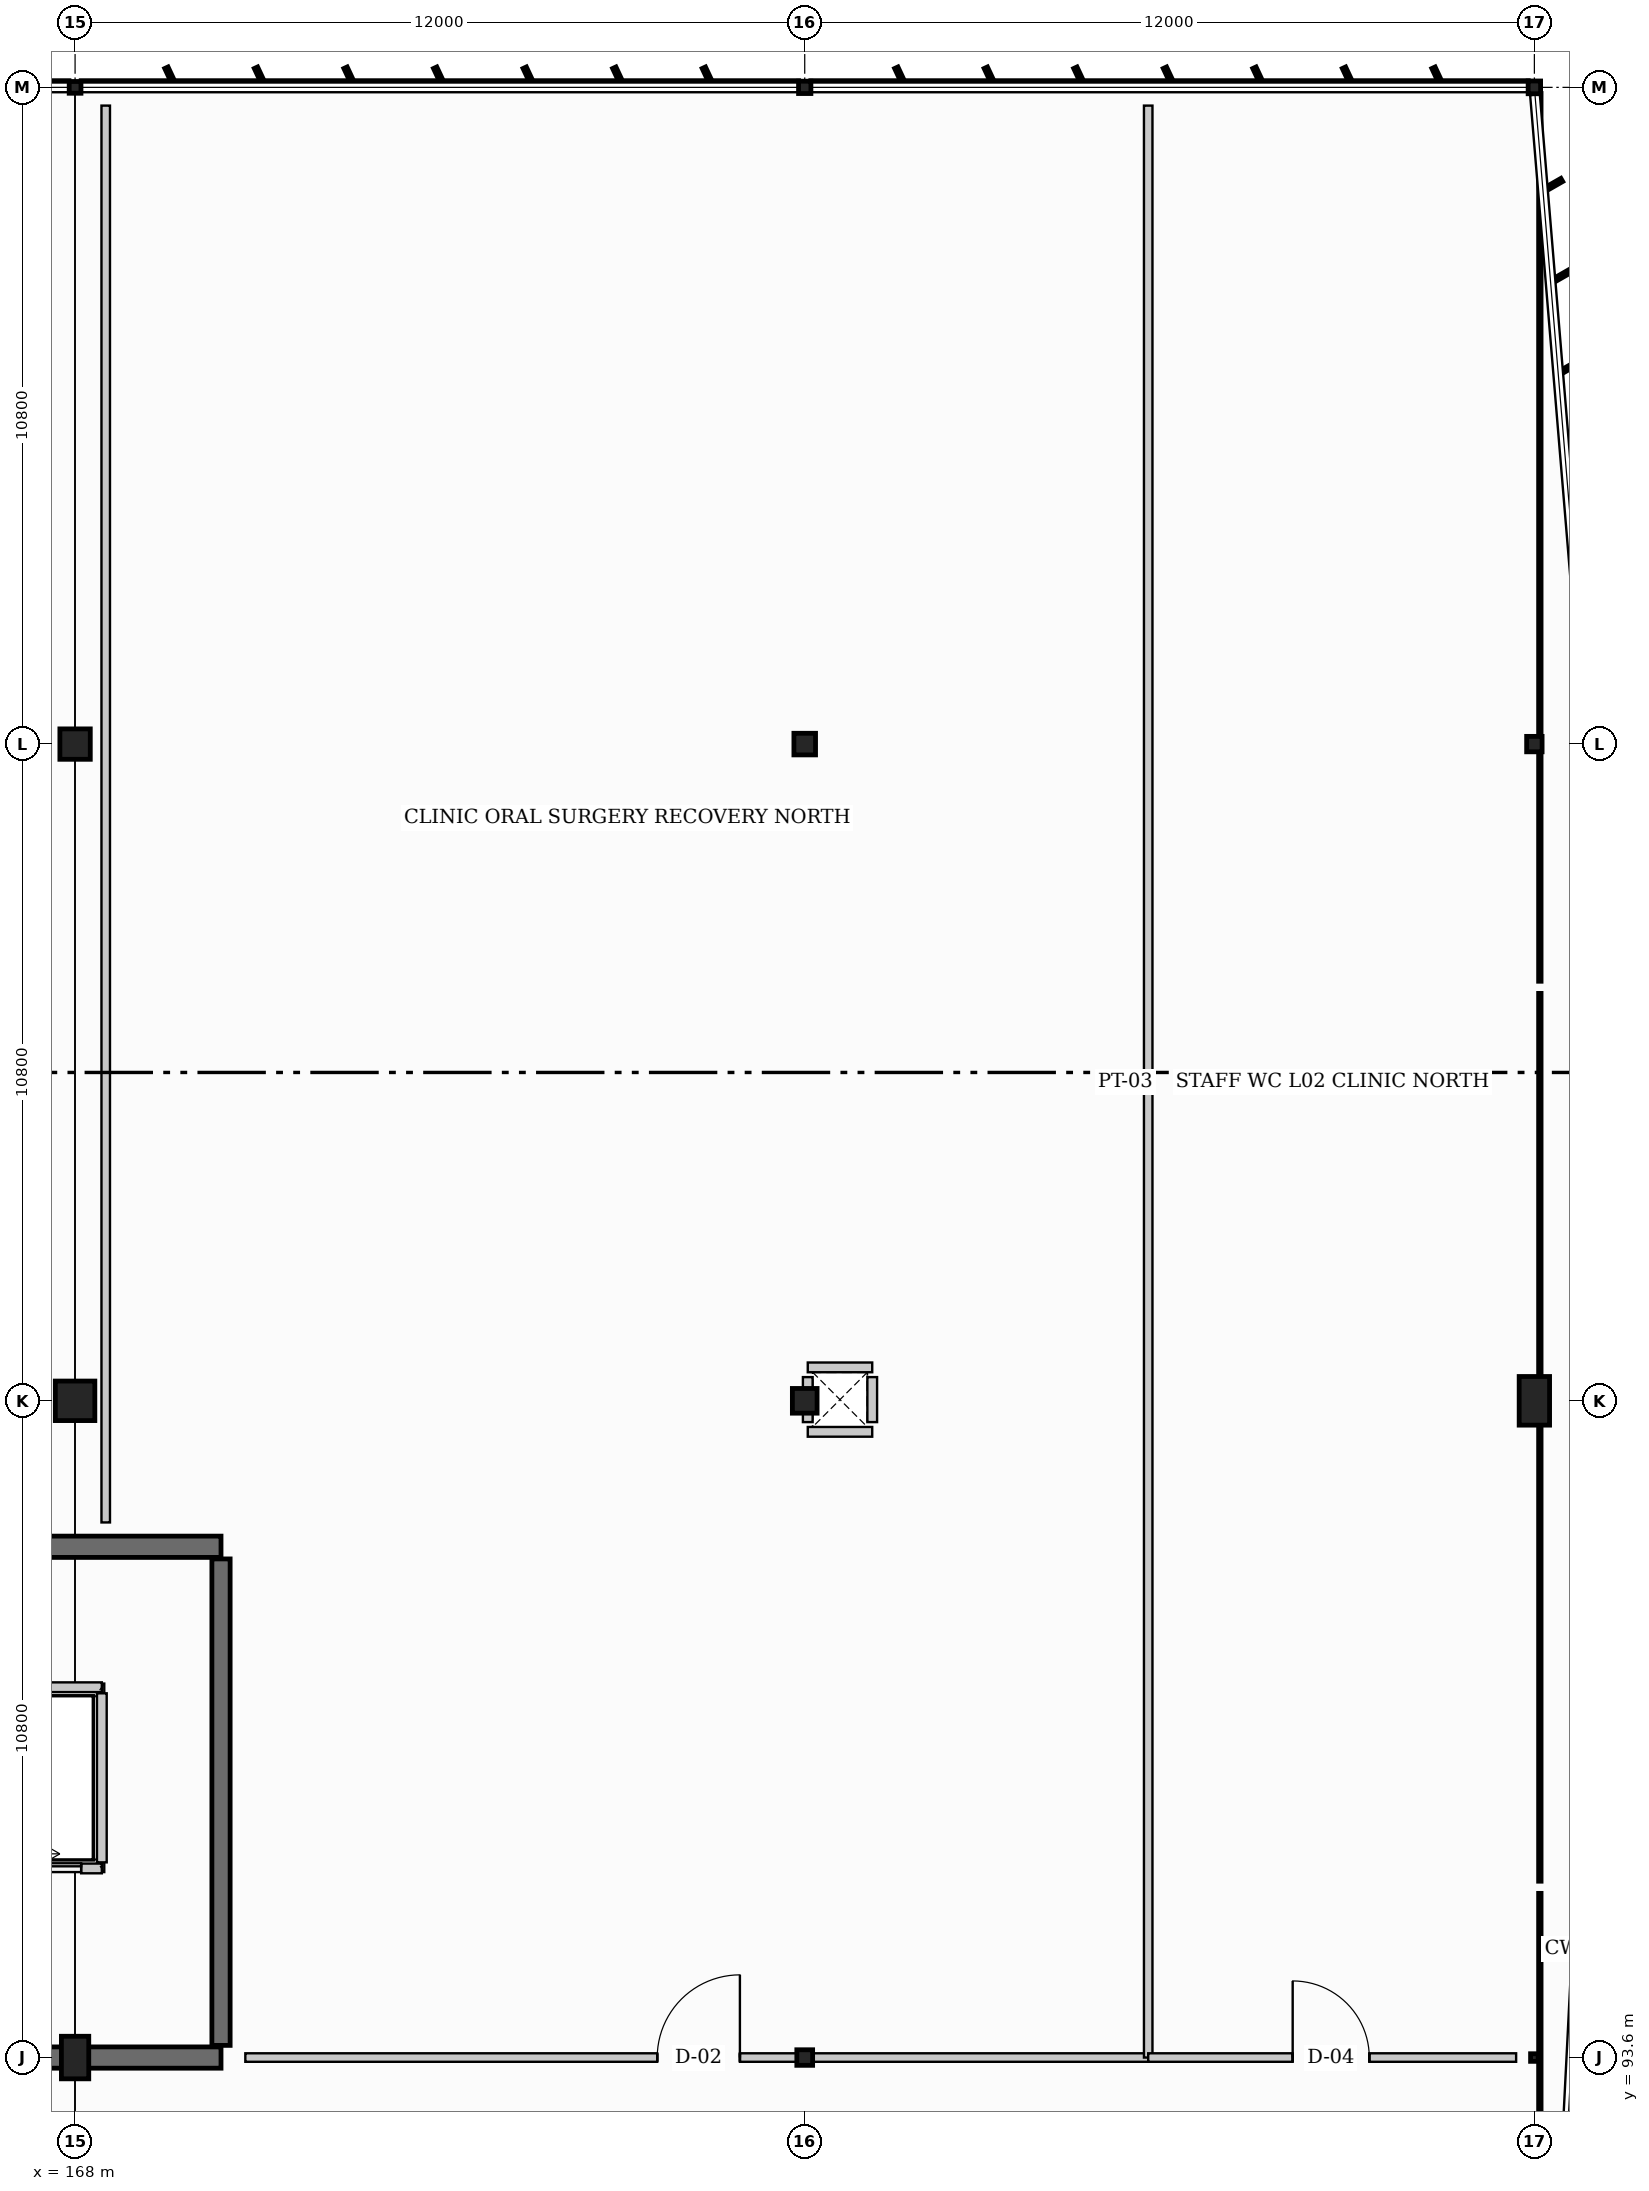
"""IFC4 building model, lengths in metres.
Left out: names, types, materials, properties, quantities, classifications, styles, units other than length and angle.
Written with IfcOpenShell. Run it as: python <this file> out.ifc"""

import sys

from ifc_helpers import new_model, si_unit, direction, frame, frame_2d, origin, origin_2d, place, context, subcontext, project, spatial, rectangle, hollow_rectangle, hollow_circle, i_section, extrude, element, fill, save


model = new_model("IFC4")
c1 = context("Model", 3, precision=1e-05, world=origin(), true_north=direction((0.0, 1.0)))
c2 = subcontext(c1, "Body", "Model", "MODEL_VIEW")
j1 = project(units=[si_unit("LENGTHUNIT", "METRE"), si_unit("PLANEANGLEUNIT", "RADIAN")], contexts=[c1])
p1 = place(None, origin())
s1 = spatial("IfcSite", under=j1, at=p1, CompositionType="ELEMENT")
p2 = place(p1, origin())
s2 = spatial("IfcBuilding", under=s1, at=p2, CompositionType="ELEMENT")
p3 = place(p2, frame((0.0, 0.0, 9.6)))
s3 = spatial("IfcBuildingStorey", under=s2, at=p3, CompositionType="ELEMENT", Elevation=9.6)
p4 = place(p3, frame((168.0, 93.6, 0.0), z_axis=(0.0, 0.0, 1.0), x_axis=(1.0, 0.0, 0.0)))
e1 = element("IfcColumn", 1, at=p4, inside=s3, PredefinedType="PILASTER", context=c2, shape_type="SweptSolid", body=[
    extrude(rectangle(XDim=0.45, YDim=0.7, at=origin_2d()), origin(), (0.0, 0.0, 1.0), 4.8),
])
p5 = place(p3, frame((168.0, 104.4, 0.0), z_axis=(0.0, 0.0, 1.0), x_axis=(1.0, 0.0, 0.0)))
e2 = element("IfcColumn", 2, at=p5, inside=s3, PredefinedType="COLUMN", context=c2, shape_type="SweptSolid", body=[
    extrude(rectangle(XDim=0.65, YDim=0.65, at=origin_2d()), origin(), (0.0, 0.0, 1.0), 4.8),
])
p6 = place(p3, frame((168.0, 115.2, 0.0), z_axis=(0.0, 0.0, 1.0), x_axis=(1.0, 0.0, 0.0)))
e3 = element("IfcColumn", 3, at=p6, inside=s3, PredefinedType="COLUMN", context=c2, shape_type="SweptSolid", body=[
    extrude(i_section(OverallWidth=0.5, OverallDepth=0.5, WebThickness=0.022, FlangeThickness=0.036, at=origin_2d()), origin(), (0.0, 0.0, 1.0), 4.8),
])
p7 = place(p3, frame((168.0, 126.0, 0.0), z_axis=(0.0, 0.0, 1.0), x_axis=(1.0, 0.0, 0.0)))
e4 = element("IfcColumn", 4, at=p7, inside=s3, PredefinedType="COLUMN", context=c2, shape_type="SweptSolid", body=[
    extrude(hollow_circle(Radius=0.097, WallThickness=0.008, at=origin_2d()), origin(), (0.0, 0.0, 1.0), 4.8),
])
p8 = place(p3, frame((180.0, 93.6, 0.0), z_axis=(0.0, 0.0, 1.0), x_axis=(0.0, 1.0, 0.0)))
e5 = element("IfcColumn", 5, at=p8, inside=s3, PredefinedType="COLUMN", context=c2, shape_type="SweptSolid", body=[
    extrude(i_section(OverallWidth=0.256, OverallDepth=0.26, WebThickness=0.01, FlangeThickness=0.017, at=origin_2d()), origin(), (0.0, 0.0, 1.0), 4.8),
])
p9 = place(p3, frame((180.0, 104.4, 0.0), z_axis=(0.0, 0.0, 1.0), x_axis=(0.0, 1.0, 0.0)))
e6 = element("IfcColumn", 6, at=p9, inside=s3, PredefinedType="COLUMN", context=c2, shape_type="SweptSolid", body=[
    extrude(hollow_circle(Radius=0.203, WallThickness=0.016, at=origin_2d()), origin(), (0.0, 0.0, 1.0), 4.8),
])
p10 = place(p3, frame((180.0, 115.2, 0.0), z_axis=(0.0, 0.0, 1.0), x_axis=(0.0, 1.0, 0.0)))
e7 = element("IfcColumn", 7, at=p10, inside=s3, PredefinedType="COLUMN", context=c2, shape_type="SweptSolid", body=[
    extrude(hollow_circle(Radius=0.178, WallThickness=0.013, at=origin_2d()), origin(), (0.0, 0.0, 1.0), 4.8),
])
p11 = place(p3, frame((180.0, 126.0, 0.0), z_axis=(0.0, 0.0, 1.0), x_axis=(0.0, 1.0, 0.0)))
e8 = element("IfcColumn", 8, at=p11, inside=s3, PredefinedType="COLUMN", context=c2, shape_type="SweptSolid", body=[
    extrude(i_section(OverallWidth=0.203, OverallDepth=0.203, WebThickness=0.007, FlangeThickness=0.011, at=origin_2d()), origin(), (0.0, 0.0, 1.0), 4.8),
])
p12 = place(p3, frame((192.0, 93.6, 0.0), z_axis=(0.0, 0.0, 1.0), x_axis=(1.0, 0.0, 0.0)))
e9 = element("IfcColumn", 9, at=p12, inside=s3, PredefinedType="COLUMN", context=c2, shape_type="SweptSolid", body=[
    extrude(hollow_rectangle(XDim=0.125, YDim=0.125, WallThickness=0.006, at=origin_2d()), origin(), (0.0, 0.0, 1.0), 4.8),
])
p13 = place(p3, frame((192.0, 104.4, 0.0), z_axis=(0.0, 0.0, 1.0), x_axis=(1.0, 0.0, 0.0)))
e10 = element("IfcColumn", 10, at=p13, inside=s3, PredefinedType="PILASTER", context=c2, shape_type="SweptSolid", body=[
    extrude(rectangle(XDim=0.5, YDim=0.8, at=origin_2d()), origin(), (0.0, 0.0, 1.0), 4.8),
])
p14 = place(p3, frame((192.0, 115.2, 0.0), z_axis=(0.0, 0.0, 1.0), x_axis=(1.0, 0.0, 0.0)))
e11 = element("IfcColumn", 11, at=p14, inside=s3, PredefinedType="COLUMN", context=c2, shape_type="SweptSolid", body=[
    extrude(i_section(OverallWidth=0.254, OverallDepth=0.254, WebThickness=0.009, FlangeThickness=0.014, at=origin_2d()), origin(), (0.0, 0.0, 1.0), 4.8),
])
p15 = place(p3, frame((192.0, 126.0, 0.0), z_axis=(0.0, 0.0, 1.0), x_axis=(1.0, 0.0, 0.0)))
e12 = element("IfcColumn", 12, at=p15, inside=s3, PredefinedType="COLUMN", context=c2, shape_type="SweptSolid", body=[
    extrude(i_section(OverallWidth=0.205, OverallDepth=0.21, WebThickness=0.009, FlangeThickness=0.014, at=origin_2d()), origin(), (0.0, 0.0, 1.0), 4.8),
])
p16 = place(p3, frame((156.0, 102.0, 0.0), z_axis=(0.0, 0.0, 1.0), x_axis=(1.0, 0.0, 0.0)))
e13 = element("IfcWall", 13, at=p16, inside=s3, PredefinedType="SHEAR", context=c2, shape_type="SweptSolid", body=[
    extrude(rectangle(XDim=14.4, YDim=0.35, at=frame_2d((7.2, 0.0))), origin(), (0.0, 0.0, 1.0), 4.8),
])
p17 = place(p3, frame((170.4, 93.6, 0.0), z_axis=(0.0, 0.0, 1.0), x_axis=(-1.0, 0.0, 0.0)))
e14 = element("IfcWall", 14, at=p17, inside=s3, PredefinedType="SHEAR", context=c2, shape_type="SweptSolid", body=[
    extrude(rectangle(XDim=14.4, YDim=0.35, at=frame_2d((7.2, 0.0))), origin(), (0.0, 0.0, 1.0), 4.8),
])
p18 = place(p17, frame((3.172, 0.0, 0.0)))
e15 = element("IfcOpeningElement", 15, at=p18, cuts=e14, PredefinedType="OPENING", context=c2, shape_type="SweptSolid", body=[
    extrude(rectangle(XDim=1.64, YDim=2.2, at=frame_2d((0.82, 1.1))), frame((0.0, 0.185, 0.0), z_axis=(0.0, -1.0, 0.0), x_axis=(1.0, 0.0, 0.0)), (0.0, 0.0, 1.0), 0.37),
])
p19 = place(p3, frame((170.4, 101.8, 0.0), z_axis=(0.0, 0.0, 1.0), x_axis=(0.0, -1.0, 0.0)))
e16 = element("IfcWall", 16, at=p19, inside=s3, PredefinedType="SHEAR", context=c2, shape_type="SweptSolid", body=[
    extrude(rectangle(XDim=8.0, YDim=0.3, at=frame_2d((4.0, 0.0))), origin(), (0.0, 0.0, 1.0), 4.8),
])
for number, where, z_axis, x_axis in (
    (17, (180.05, 103.89, 0.0), (0.0, 0.0, 1.0), (1.0, 0.0, 0.0)),
    (18, (181.11, 104.95, 0.0), (0.0, 0.0, 1.0), (-1.0, 0.0, 0.0)),
):
    element("IfcWall", number, at=place(p3, frame(where, z_axis=z_axis, x_axis=x_axis)), inside=s3, PredefinedType="PARTITIONING", context=c2, shape_type="SweptSolid", body=[
        extrude(rectangle(XDim=1.06, YDim=0.16, at=frame_2d((0.53, 0.0))), origin(), (0.0, 0.0, 1.0), 3.55),
    ])
for number, where, z_axis, x_axis in (
    (19, (180.05, 104.79, 0.0), (0.0, 0.0, 1.0), (0.0, -1.0, 0.0)),
    (20, (181.11, 104.05, 0.0), (0.0, 0.0, 1.0), (0.0, 1.0, 0.0)),
):
    element("IfcWall", number, at=place(p3, frame(where, z_axis=z_axis, x_axis=x_axis)), inside=s3, PredefinedType="PARTITIONING", context=c2, shape_type="SweptSolid", body=[
        extrude(rectangle(XDim=0.74, YDim=0.16, at=frame_2d((0.37, 0.0))), origin(), (0.0, 0.0, 1.0), 3.55),
    ])
p20 = place(p3, frame((166.36, 96.71, 0.0), z_axis=(0.0, 0.0, 1.0), x_axis=(1.0, 0.0, 0.0)))
e21 = element("IfcWall", 21, at=p20, inside=s3, PredefinedType="PARTITIONING", context=c2, shape_type="SweptSolid", body=[
    extrude(rectangle(XDim=2.08, YDim=0.16, at=frame_2d((1.04, 0.0))), origin(), (0.0, 0.0, 1.0), 4.43),
])
p21 = place(p20, frame((0.34, 0.0, 0.0)))
e22 = element("IfcOpeningElement", 22, at=p21, cuts=e21, PredefinedType="OPENING", context=c2, shape_type="SweptSolid", body=[
    extrude(rectangle(XDim=1.4, YDim=2.2, at=frame_2d((0.7, 1.1))), frame((0.0, 0.09, 0.0), z_axis=(0.0, -1.0, 0.0), x_axis=(1.0, 0.0, 0.0)), (0.0, 0.0, 1.0), 0.18),
])
p22 = place(p3, frame((168.44, 99.69, 0.0), z_axis=(0.0, 0.0, 1.0), x_axis=(-1.0, 0.0, 0.0)))
e23 = element("IfcWall", 23, at=p22, inside=s3, PredefinedType="PARTITIONING", context=c2, shape_type="SweptSolid", body=[
    extrude(rectangle(XDim=2.08, YDim=0.16, at=frame_2d((1.04, 0.0))), origin(), (0.0, 0.0, 1.0), 4.43),
])
p23 = place(p3, frame((168.44, 96.81, 0.0), z_axis=(0.0, 0.0, 1.0), x_axis=(0.0, 1.0, 0.0)))
e24 = element("IfcWall", 24, at=p23, inside=s3, PredefinedType="PARTITIONING", context=c2, shape_type="SweptSolid", body=[
    extrude(rectangle(XDim=2.78, YDim=0.16, at=frame_2d((1.39, 0.0))), origin(), (0.0, 0.0, 1.0), 4.43),
])
p24 = place(p3, frame((168.504, 102.4, 0.0), z_axis=(0.0, 0.0, 1.0), x_axis=(0.0, 1.0, 0.0)))
e25 = element("IfcWall", 25, at=p24, inside=s3, PredefinedType="PARTITIONING", context=c2, shape_type="SweptSolid", body=[
    extrude(rectangle(XDim=23.3, YDim=0.14, at=frame_2d((11.65, 0.0))), origin(), (0.0, 0.0, 1.0), 3.475),
])
p25 = place(p3, frame((170.8, 93.6, 0.0), z_axis=(0.0, 0.0, 1.0), x_axis=(1.0, 0.0, 0.0)))
e26 = element("IfcWall", 26, at=p25, inside=s3, PredefinedType="PARTITIONING", context=c2, shape_type="SweptSolid", body=[
    extrude(rectangle(XDim=14.849, YDim=0.14, at=frame_2d((7.424, 0.0))), origin(), (0.0, 0.0, 1.0), 3.525),
])
p26 = place(p25, frame((6.774, 0.0, 0.0)))
e27 = element("IfcOpeningElement", 27, at=p26, cuts=e26, PredefinedType="OPENING", context=c2, shape_type="SweptSolid", body=[
    extrude(rectangle(XDim=1.36, YDim=2.18, at=frame_2d((0.68, 1.09))), frame((0.0, 0.08, 0.0), z_axis=(0.0, -1.0, 0.0), x_axis=(1.0, 0.0, 0.0)), (0.0, 0.0, 1.0), 0.16),
])
p27 = place(p3, frame((185.649, 93.6, 0.0), z_axis=(0.0, 0.0, 1.0), x_axis=(0.0, 1.0, 0.0)))
e28 = element("IfcWall", 28, at=p27, inside=s3, PredefinedType="PARTITIONING", context=c2, shape_type="SweptSolid", body=[
    extrude(rectangle(XDim=32.1, YDim=0.14, at=frame_2d((16.05, 0.0))), origin(), (0.0, 0.0, 1.0), 3.475),
])
p28 = place(p3, frame((185.649, 93.6, 0.0), z_axis=(0.0, 0.0, 1.0), x_axis=(1.0, 0.0, 0.0)))
e29 = element("IfcWall", 29, at=p28, inside=s3, PredefinedType="PARTITIONING", context=c2, shape_type="SweptSolid", body=[
    extrude(rectangle(XDim=6.051, YDim=0.14, at=frame_2d((3.025, 0.0))), origin(), (0.0, 0.0, 1.0), 3.971),
])
p29 = place(p28, frame((2.376, 0.0, 0.0)))
e30 = element("IfcOpeningElement", 30, at=p29, cuts=e29, PredefinedType="OPENING", context=c2, shape_type="SweptSolid", body=[
    extrude(rectangle(XDim=1.26, YDim=2.14, at=frame_2d((0.63, 1.07))), frame((0.0, 0.08, 0.0), z_axis=(0.0, -1.0, 0.0), x_axis=(1.0, 0.0, 0.0)), (0.0, 0.0, 1.0), 0.16),
])
p30 = place(p21, origin())
e31 = element("IfcDoor", 31, at=p30, inside=s3, OperationType="SLIDING_TO_LEFT", PredefinedType="DOOR", context=c2, shape_type="SweptSolid", body=[
    extrude(rectangle(XDim=1.4, YDim=2.2, at=frame_2d((0.7, 1.1))), frame((0.0, 0.025, 0.0), z_axis=(0.0, -1.0, 0.0), x_axis=(1.0, 0.0, 0.0)), (0.0, 0.0, 1.0), 0.05),
])
fill(e22, e31)
p31 = place(p26, origin())
e32 = element("IfcDoor", 32, at=p31, inside=s3, OperationType="SINGLE_SWING_RIGHT", PredefinedType="DOOR", context=c2, shape_type="SweptSolid", body=[
    extrude(rectangle(XDim=1.36, YDim=2.18, at=frame_2d((0.68, 1.09))), frame((0.0, 0.025, 0.0), z_axis=(0.0, -1.0, 0.0), x_axis=(1.0, 0.0, 0.0)), (0.0, 0.0, 1.0), 0.05),
])
fill(e27, e32)
p32 = place(p29, origin())
e33 = element("IfcDoor", 33, at=p32, inside=s3, OperationType="SINGLE_SWING_LEFT", PredefinedType="DOOR", context=c2, shape_type="SweptSolid", body=[
    extrude(rectangle(XDim=1.26, YDim=2.14, at=frame_2d((0.63, 1.07))), frame((0.0, 0.025, 0.0), z_axis=(0.0, -1.0, 0.0), x_axis=(1.0, 0.0, 0.0)), (0.0, 0.0, 1.0), 0.05),
])
fill(e30, e33)
save(model, sys.argv[1])
